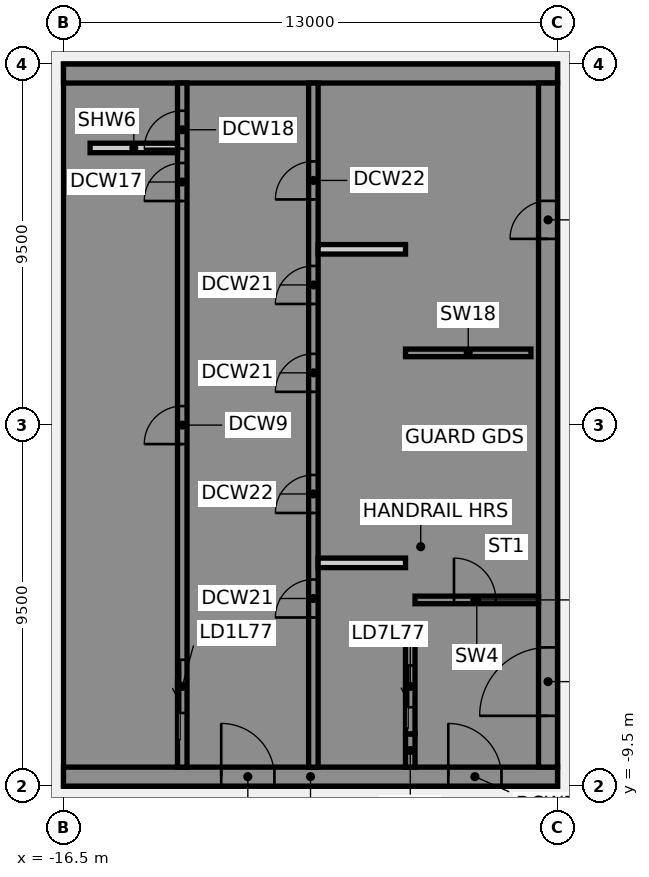
"""IFC4 building model, lengths in metres.
Left out: names, types, materials, properties, quantities, classifications, styles, units other than length and angle.
Written with IfcOpenShell. Run it as: python <this file> out.ifc"""

import sys

from ifc_helpers import new_model, si_unit, direction, frame, frame_2d, origin, place, context, subcontext, project, spatial, polyline, rectangle, outline, extrude, element, fill, save


model = new_model("IFC4")
c1 = context("Model", 3, precision=1e-05, world=origin(), true_north=direction((0.0, 1.0)))
c2 = subcontext(c1, "Body", "Model", "MODEL_VIEW")
j1 = project(units=[si_unit("LENGTHUNIT", "METRE"), si_unit("PLANEANGLEUNIT", "RADIAN")], contexts=[c1])
p1 = place(None, origin())
s1 = spatial("IfcSite", under=j1, at=p1, CompositionType="ELEMENT")
p2 = place(p1, origin())
s2 = spatial("IfcBuilding", under=s1, at=p2, CompositionType="ELEMENT")
p3 = place(p2, frame((0.0, 0.0, 313.4)))
s3 = spatial("IfcBuildingStorey", under=s2, at=p3, CompositionType="ELEMENT", Elevation=313.4)
p4 = place(p3, frame((-16.5, -9.25, 0.0), z_axis=(0.0, 0.0, 1.0), x_axis=(1.0, 0.0, 0.0)))
e1 = element("IfcWall", 1, at=p4, inside=s3, PredefinedType="SHEAR", context=c2, shape_type="SweptSolid", body=[
    extrude(rectangle(XDim=13.0, YDim=0.5, at=frame_2d((6.5, 0.0))), origin(), (0.0, 0.0, 1.0), 3.82),
])
p5 = place(p4, frame((4.15, 0.0, 0.0)))
e2 = element("IfcOpeningElement", 2, at=p5, cuts=e1, PredefinedType="OPENING", context=c2, shape_type="SweptSolid", body=[
    extrude(rectangle(XDim=1.4, YDim=2.1, at=frame_2d((0.7, 1.05))), frame((0.0, 0.26, 0.0), z_axis=(0.0, -1.0, 0.0), x_axis=(1.0, 0.0, 0.0)), (0.0, 0.0, 1.0), 0.52),
])
p6 = place(p4, frame((10.125, 0.0, 0.0)))
e3 = element("IfcOpeningElement", 3, at=p6, cuts=e1, PredefinedType="OPENING", context=c2, shape_type="SweptSolid", body=[
    extrude(rectangle(XDim=1.4, YDim=2.1, at=frame_2d((0.7, 1.05))), frame((0.0, 0.26, 0.0), z_axis=(0.0, -1.0, 0.0), x_axis=(1.0, 0.0, 0.0)), (0.0, 0.0, 1.0), 0.52),
])
p7 = place(p3, origin())
e4 = element("IfcWall", 4, at=p7, inside=s3, PredefinedType="SHEAR", context=c2, shape_type="SweptSolid", body=[
    extrude(outline(polyline([(-13.5, -8.125), (-16.0, -8.125), (-16.0, -5.625), (-13.5, -5.625), (-13.5, -5.375), (-16.0, -5.375), (-16.0, 8.125), (-13.5, 8.125), (-13.5, 9.0), (-16.0, 9.0), (-16.5, 9.0), (-16.5, -9.0), (-16.0, -9.0), (-13.5, -9.0), (-13.5, -8.125)])), origin(), (0.0, 0.0, 1.0), 3.82),
])
p8 = place(p3, frame((-16.5, 9.25, 0.0), z_axis=(0.0, 0.0, 1.0), x_axis=(1.0, 0.0, 0.0)))
e5 = element("IfcWall", 5, at=p8, inside=s3, PredefinedType="SHEAR", context=c2, shape_type="SweptSolid", body=[
    extrude(rectangle(XDim=13.0, YDim=0.5, at=frame_2d((6.5, 0.0))), origin(), (0.0, 0.0, 1.0), 3.82),
])
p9 = place(p3, origin())
e6 = element("IfcWall", 6, at=p9, inside=s3, PredefinedType="SHEAR", context=c2, shape_type="SweptSolid", body=[
    extrude(outline(polyline([(-9.8, -5.625), (-7.5, -5.625), (-7.25, -5.625), (-7.25, 9.0), (-7.5, 9.0), (-9.8, 9.0), (-9.8, 8.125), (-7.5, 8.125), (-7.5, -5.375), (-9.8, -5.375), (-9.8, -5.625)])), origin(), (0.0, 0.0, 1.0), 3.82),
])
p10 = place(p3, origin())
e7 = element("IfcWall", 7, at=p10, inside=s3, PredefinedType="SHEAR", context=c2, shape_type="SweptSolid", body=[
    extrude(outline(polyline([(-7.5, -8.125), (-9.55, -8.125), (-9.55, -5.625), (-9.8, -5.625), (-9.8, -8.125), (-9.8, -9.0), (-7.5, -9.0), (-7.5, -8.125)])), origin(), (0.0, 0.0, 1.0), 3.82),
])
p11 = place(p3, frame((-7.375, -9.0, 0.0), z_axis=(0.0, 0.0, 1.0), x_axis=(0.0, 1.0, 0.0)))
e8 = element("IfcWall", 8, at=p11, inside=s3, PredefinedType="SHEAR", context=c2, shape_type="SweptSolid", body=[
    extrude(rectangle(XDim=0.875, YDim=0.25, at=frame_2d((0.438, 0.0))), origin(), (0.0, 0.0, 1.0), 3.82),
])
p12 = place(p3, frame((-7.5, 1.9, 0.0), z_axis=(0.0, 0.0, 1.0), x_axis=(1.0, 0.0, 0.0)))
e9 = element("IfcWall", 9, at=p12, inside=s3, PredefinedType="SHEAR", context=c2, shape_type="SweptSolid", body=[
    extrude(rectangle(XDim=3.3, YDim=0.2, at=frame_2d((1.65, 0.0))), origin(), (0.0, 0.0, 1.0), 3.82),
])
p13 = place(p3, frame((-13.375, -9.0, 0.0), z_axis=(0.0, 0.0, 1.0), x_axis=(0.0, 1.0, 0.0)))
e10 = element("IfcWall", 10, at=p13, inside=s3, PredefinedType="SHEAR", context=c2, shape_type="SweptSolid", body=[
    extrude(rectangle(XDim=18.0, YDim=0.25, at=frame_2d((9.0, 0.0))), origin(), (0.0, 0.0, 1.0), 3.82),
])
p14 = place(p13, frame((1.425, 0.0, 0.0)))
e11 = element("IfcOpeningElement", 11, at=p14, cuts=e10, PredefinedType="OPENING", context=c2, shape_type="SweptSolid", body=[
    extrude(rectangle(XDim=1.4, YDim=2.1, at=frame_2d((0.7, 1.05))), frame((0.0, 0.135, 0.0), z_axis=(0.0, -1.0, 0.0), x_axis=(1.0, 0.0, 0.0)), (0.0, 0.0, 1.0), 0.27),
])
p15 = place(p13, frame((8.5, 0.0, 0.0)))
e12 = element("IfcOpeningElement", 12, at=p15, cuts=e10, PredefinedType="OPENING", context=c2, shape_type="SweptSolid", body=[
    extrude(rectangle(XDim=1.0, YDim=2.1, at=frame_2d((0.5, 1.05))), frame((0.0, 0.135, 0.0), z_axis=(0.0, -1.0, 0.0), x_axis=(1.0, 0.0, 0.0)), (0.0, 0.0, 1.0), 0.27),
])
p16 = place(p13, frame((14.896, 0.0, 0.0)))
e13 = element("IfcOpeningElement", 13, at=p16, cuts=e10, PredefinedType="OPENING", context=c2, shape_type="SweptSolid", body=[
    extrude(rectangle(XDim=1.0, YDim=2.1, at=frame_2d((0.5, 1.05))), frame((0.0, 0.135, 0.0), z_axis=(0.0, -1.0, 0.0), x_axis=(1.0, 0.0, 0.0)), (0.0, 0.0, 1.0), 0.27),
])
p17 = place(p13, frame((16.271, 0.0, 0.0)))
e14 = element("IfcOpeningElement", 14, at=p17, cuts=e10, PredefinedType="OPENING", context=c2, shape_type="SweptSolid", body=[
    extrude(rectangle(XDim=1.0, YDim=2.1, at=frame_2d((0.5, 1.05))), frame((0.0, 0.135, 0.0), z_axis=(0.0, -1.0, 0.0), x_axis=(1.0, 0.0, 0.0)), (0.0, 0.0, 1.0), 0.27),
])
p18 = place(p3, frame((-9.925, -9.0, 0.0), z_axis=(0.0, 0.0, 1.0), x_axis=(0.0, 1.0, 0.0)))
e15 = element("IfcWall", 15, at=p18, inside=s3, PredefinedType="SHEAR", context=c2, shape_type="SweptSolid", body=[
    extrude(rectangle(XDim=18.0, YDim=0.25, at=frame_2d((9.0, 0.0))), origin(), (0.0, 0.0, 1.0), 3.82),
])
p19 = place(p18, frame((3.938, 0.0, 0.0)))
e16 = element("IfcOpeningElement", 16, at=p19, cuts=e15, PredefinedType="OPENING", context=c2, shape_type="SweptSolid", body=[
    extrude(rectangle(XDim=1.0, YDim=2.1, at=frame_2d((0.5, 1.05))), frame((0.0, 0.135, 0.0), z_axis=(0.0, -1.0, 0.0), x_axis=(1.0, 0.0, 0.0)), (0.0, 0.0, 1.0), 0.27),
])
p20 = place(p18, frame((6.688, 0.0, 0.0)))
e17 = element("IfcOpeningElement", 17, at=p20, cuts=e15, PredefinedType="OPENING", context=c2, shape_type="SweptSolid", body=[
    extrude(rectangle(XDim=1.0, YDim=2.1, at=frame_2d((0.5, 1.05))), frame((0.0, 0.135, 0.0), z_axis=(0.0, -1.0, 0.0), x_axis=(1.0, 0.0, 0.0)), (0.0, 0.0, 1.0), 0.27),
])
p21 = place(p18, frame((9.875, 0.0, 0.0)))
e18 = element("IfcOpeningElement", 18, at=p21, cuts=e15, PredefinedType="OPENING", context=c2, shape_type="SweptSolid", body=[
    extrude(rectangle(XDim=1.0, YDim=2.1, at=frame_2d((0.5, 1.05))), frame((0.0, 0.135, 0.0), z_axis=(0.0, -1.0, 0.0), x_axis=(1.0, 0.0, 0.0)), (0.0, 0.0, 1.0), 0.27),
])
p22 = place(p18, frame((12.188, 0.0, 0.0)))
e19 = element("IfcOpeningElement", 19, at=p22, cuts=e15, PredefinedType="OPENING", context=c2, shape_type="SweptSolid", body=[
    extrude(rectangle(XDim=1.0, YDim=2.1, at=frame_2d((0.5, 1.05))), frame((0.0, 0.135, 0.0), z_axis=(0.0, -1.0, 0.0), x_axis=(1.0, 0.0, 0.0)), (0.0, 0.0, 1.0), 0.27),
])
p23 = place(p18, frame((14.938, 0.0, 0.0)))
e20 = element("IfcOpeningElement", 20, at=p23, cuts=e15, PredefinedType="OPENING", context=c2, shape_type="SweptSolid", body=[
    extrude(rectangle(XDim=1.0, YDim=2.1, at=frame_2d((0.5, 1.05))), frame((0.0, 0.135, 0.0), z_axis=(0.0, -1.0, 0.0), x_axis=(1.0, 0.0, 0.0)), (0.0, 0.0, 1.0), 0.27),
])
p24 = place(p3, frame((-7.375, -8.125, 0.0), z_axis=(0.0, 0.0, 1.0), x_axis=(0.0, 1.0, 0.0)))
e21 = element("IfcWall", 21, at=p24, inside=s3, PredefinedType="SHEAR", context=c2, shape_type="SweptSolid", body=[
    extrude(rectangle(XDim=2.5, YDim=0.25, at=frame_2d((1.25, 0.0))), origin(), (0.0, 0.0, 1.0), 3.82),
])
p25 = place(p24, frame((0.7, 0.0, 0.0)))
e22 = element("IfcOpeningElement", 22, at=p25, cuts=e21, PredefinedType="OPENING", context=c2, shape_type="SweptSolid", body=[
    extrude(rectangle(XDim=1.1, YDim=2.1, at=frame_2d((0.55, 1.05))), frame((0.0, 0.135, 0.0), z_axis=(0.0, -1.0, 0.0), x_axis=(1.0, 0.0, 0.0)), (0.0, 0.0, 1.0), 0.27),
])
p26 = place(p3, frame((-3.75, -9.0, 0.0), z_axis=(0.0, 0.0, 1.0), x_axis=(0.0, 1.0, 0.0)))
e23 = element("IfcWall", 23, at=p26, inside=s3, PredefinedType="SHEAR", context=c2, shape_type="SweptSolid", body=[
    extrude(rectangle(XDim=18.0, YDim=0.5, at=frame_2d((9.0, 0.0))), origin(), (0.0, 0.0, 1.0), 3.82),
])
p27 = place(p26, frame((1.35, 0.0, 0.0)))
e24 = element("IfcOpeningElement", 24, at=p27, cuts=e23, PredefinedType="OPENING", context=c2, shape_type="SweptSolid", body=[
    extrude(rectangle(XDim=1.8, YDim=2.1, at=frame_2d((0.9, 1.05))), frame((0.0, 0.26, 0.0), z_axis=(0.0, -1.0, 0.0), x_axis=(1.0, 0.0, 0.0)), (0.0, 0.0, 1.0), 0.52),
])
p28 = place(p26, frame((13.9, 0.0, 0.0)))
e25 = element("IfcOpeningElement", 25, at=p28, cuts=e23, PredefinedType="OPENING", context=c2, shape_type="SweptSolid", body=[
    extrude(rectangle(XDim=1.0, YDim=2.1, at=frame_2d((0.5, 1.05))), frame((0.0, 0.26, 0.0), z_axis=(0.0, -1.0, 0.0), x_axis=(1.0, 0.0, 0.0)), (0.0, 0.0, 1.0), 0.52),
])
p29 = place(p3, frame((-7.25, -4.6, 0.0), z_axis=(0.0, 0.0, 1.0), x_axis=(1.0, 0.0, 0.0)))
e26 = element("IfcWall", 26, at=p29, inside=s3, PredefinedType="SHEAR", context=c2, shape_type="SweptSolid", body=[
    extrude(rectangle(XDim=3.25, YDim=0.2, at=frame_2d((1.625, 0.0))), origin(), (0.0, 0.0, 1.0), 3.82),
])
p30 = place(p29, frame((1.025, 0.0, 0.0)))
e27 = element("IfcOpeningElement", 27, at=p30, cuts=e26, PredefinedType="OPENING", context=c2, shape_type="SweptSolid", body=[
    extrude(rectangle(XDim=1.1, YDim=2.1, at=frame_2d((0.55, 1.05))), frame((0.0, 0.11, 0.0), z_axis=(0.0, -1.0, 0.0), x_axis=(1.0, 0.0, 0.0)), (0.0, 0.0, 1.0), 0.22),
])
for number, where, z_axis, x_axis in (
    (28, (-15.8, 7.292, 0.0), (0.0, 0.0, 1.0), (1.0, 0.0, 0.0)),
    (29, (-9.8, -3.625, 0.0), (0.0, 0.0, 1.0), (1.0, 0.0, 0.0)),
    (30, (-9.8, 4.625, 0.0), (0.0, 0.0, 1.0), (1.0, 0.0, 0.0)),
):
    element("IfcWall", number, at=place(p3, frame(where, z_axis=z_axis, x_axis=x_axis)), inside=s3, PredefinedType="PARTITIONING", context=c2, shape_type="SweptSolid", body=[
        extrude(rectangle(XDim=2.3, YDim=0.25, at=frame_2d((1.15, 0.0))), origin(), (0.0, 0.0, 1.0), 3.82),
    ])
p31 = place(p5, origin())
e31 = element("IfcDoor", 31, at=p31, inside=s3, OperationType="SINGLE_SWING_LEFT", PredefinedType="DOOR", context=c2, shape_type="SweptSolid", body=[
    extrude(rectangle(XDim=1.4, YDim=2.1, at=frame_2d((0.7, 1.05))), frame((0.0, 0.025, 0.0), z_axis=(0.0, -1.0, 0.0), x_axis=(1.0, 0.0, 0.0)), (0.0, 0.0, 1.0), 0.05),
])
fill(e2, e31)
p32 = place(p6, origin())
e32 = element("IfcDoor", 32, at=p32, inside=s3, OperationType="SINGLE_SWING_LEFT", PredefinedType="DOOR", context=c2, shape_type="SweptSolid", body=[
    extrude(rectangle(XDim=1.4, YDim=2.1, at=frame_2d((0.7, 1.05))), frame((0.0, 0.025, 0.0), z_axis=(0.0, -1.0, 0.0), x_axis=(1.0, 0.0, 0.0)), (0.0, 0.0, 1.0), 0.05),
])
fill(e3, e32)
p33 = place(p27, origin())
e33 = element("IfcDoor", 33, at=p33, inside=s3, OperationType="SINGLE_SWING_LEFT", PredefinedType="DOOR", context=c2, shape_type="SweptSolid", body=[
    extrude(rectangle(XDim=1.8, YDim=2.1, at=frame_2d((0.9, 1.05))), frame((0.0, 0.025, 0.0), z_axis=(0.0, -1.0, 0.0), x_axis=(1.0, 0.0, 0.0)), (0.0, 0.0, 1.0), 0.05),
])
fill(e24, e33)
p34 = place(p28, origin())
e34 = element("IfcDoor", 34, at=p34, inside=s3, OperationType="SINGLE_SWING_LEFT", PredefinedType="DOOR", context=c2, shape_type="SweptSolid", body=[
    extrude(rectangle(XDim=1.0, YDim=2.1, at=frame_2d((0.5, 1.05))), frame((0.0, 0.025, 0.0), z_axis=(0.0, -1.0, 0.0), x_axis=(1.0, 0.0, 0.0)), (0.0, 0.0, 1.0), 0.05),
])
fill(e25, e34)
p35 = place(p30, origin())
e35 = element("IfcDoor", 35, at=p35, inside=s3, OperationType="SINGLE_SWING_LEFT", PredefinedType="DOOR", context=c2, shape_type="SweptSolid", body=[
    extrude(rectangle(XDim=1.1, YDim=2.1, at=frame_2d((0.55, 1.05))), frame((0.0, 0.025, 0.0), z_axis=(0.0, -1.0, 0.0), x_axis=(1.0, 0.0, 0.0)), (0.0, 0.0, 1.0), 0.05),
])
fill(e27, e35)
p36 = place(p14, origin())
e36 = element("IfcDoor", 36, at=p36, inside=s3, OperationType="SLIDING_TO_LEFT", PredefinedType="DOOR", context=c2, shape_type="SweptSolid", body=[
    extrude(rectangle(XDim=1.4, YDim=2.1, at=frame_2d((0.7, 1.05))), frame((0.0, 0.025, 0.0), z_axis=(0.0, -1.0, 0.0), x_axis=(1.0, 0.0, 0.0)), (0.0, 0.0, 1.0), 0.05),
])
fill(e11, e36)
p37 = place(p25, origin())
e37 = element("IfcDoor", 37, at=p37, inside=s3, OperationType="SLIDING_TO_LEFT", PredefinedType="DOOR", context=c2, shape_type="SweptSolid", body=[
    extrude(rectangle(XDim=1.1, YDim=2.1, at=frame_2d((0.55, 1.05))), frame((0.0, 0.025, 0.0), z_axis=(0.0, -1.0, 0.0), x_axis=(1.0, 0.0, 0.0)), (0.0, 0.0, 1.0), 0.05),
])
fill(e22, e37)
p38 = place(p15, origin())
e38 = element("IfcDoor", 38, at=p38, inside=s3, OperationType="SINGLE_SWING_LEFT", PredefinedType="DOOR", context=c2, shape_type="SweptSolid", body=[
    extrude(rectangle(XDim=1.0, YDim=2.1, at=frame_2d((0.5, 1.05))), frame((0.0, 0.025, 0.0), z_axis=(0.0, -1.0, 0.0), x_axis=(1.0, 0.0, 0.0)), (0.0, 0.0, 1.0), 0.05),
])
fill(e12, e38)
p39 = place(p16, origin())
e39 = element("IfcDoor", 39, at=p39, inside=s3, OperationType="SINGLE_SWING_LEFT", PredefinedType="DOOR", context=c2, shape_type="SweptSolid", body=[
    extrude(rectangle(XDim=1.0, YDim=2.1, at=frame_2d((0.5, 1.05))), frame((0.0, 0.025, 0.0), z_axis=(0.0, -1.0, 0.0), x_axis=(1.0, 0.0, 0.0)), (0.0, 0.0, 1.0), 0.05),
])
fill(e13, e39)
p40 = place(p17, origin())
e40 = element("IfcDoor", 40, at=p40, inside=s3, OperationType="SINGLE_SWING_LEFT", PredefinedType="DOOR", context=c2, shape_type="SweptSolid", body=[
    extrude(rectangle(XDim=1.0, YDim=2.1, at=frame_2d((0.5, 1.05))), frame((0.0, 0.025, 0.0), z_axis=(0.0, -1.0, 0.0), x_axis=(1.0, 0.0, 0.0)), (0.0, 0.0, 1.0), 0.05),
])
fill(e14, e40)
p41 = place(p19, origin())
e41 = element("IfcDoor", 41, at=p41, inside=s3, OperationType="SINGLE_SWING_LEFT", PredefinedType="DOOR", context=c2, shape_type="SweptSolid", body=[
    extrude(rectangle(XDim=1.0, YDim=2.1, at=frame_2d((0.5, 1.05))), frame((0.0, 0.025, 0.0), z_axis=(0.0, -1.0, 0.0), x_axis=(1.0, 0.0, 0.0)), (0.0, 0.0, 1.0), 0.05),
])
fill(e16, e41)
p42 = place(p20, origin())
e42 = element("IfcDoor", 42, at=p42, inside=s3, OperationType="SINGLE_SWING_LEFT", PredefinedType="DOOR", context=c2, shape_type="SweptSolid", body=[
    extrude(rectangle(XDim=1.0, YDim=2.1, at=frame_2d((0.5, 1.05))), frame((0.0, 0.025, 0.0), z_axis=(0.0, -1.0, 0.0), x_axis=(1.0, 0.0, 0.0)), (0.0, 0.0, 1.0), 0.05),
])
fill(e17, e42)
p43 = place(p21, origin())
e43 = element("IfcDoor", 43, at=p43, inside=s3, OperationType="SINGLE_SWING_LEFT", PredefinedType="DOOR", context=c2, shape_type="SweptSolid", body=[
    extrude(rectangle(XDim=1.0, YDim=2.1, at=frame_2d((0.5, 1.05))), frame((0.0, 0.025, 0.0), z_axis=(0.0, -1.0, 0.0), x_axis=(1.0, 0.0, 0.0)), (0.0, 0.0, 1.0), 0.05),
])
fill(e18, e43)
p44 = place(p22, origin())
e44 = element("IfcDoor", 44, at=p44, inside=s3, OperationType="SINGLE_SWING_LEFT", PredefinedType="DOOR", context=c2, shape_type="SweptSolid", body=[
    extrude(rectangle(XDim=1.0, YDim=2.1, at=frame_2d((0.5, 1.05))), frame((0.0, 0.025, 0.0), z_axis=(0.0, -1.0, 0.0), x_axis=(1.0, 0.0, 0.0)), (0.0, 0.0, 1.0), 0.05),
])
fill(e19, e44)
p45 = place(p23, origin())
e45 = element("IfcDoor", 45, at=p45, inside=s3, OperationType="SINGLE_SWING_LEFT", PredefinedType="DOOR", context=c2, shape_type="SweptSolid", body=[
    extrude(rectangle(XDim=1.0, YDim=2.1, at=frame_2d((0.5, 1.05))), frame((0.0, 0.025, 0.0), z_axis=(0.0, -1.0, 0.0), x_axis=(1.0, 0.0, 0.0)), (0.0, 0.0, 1.0), 0.05),
])
fill(e20, e45)
save(model, sys.argv[1])
